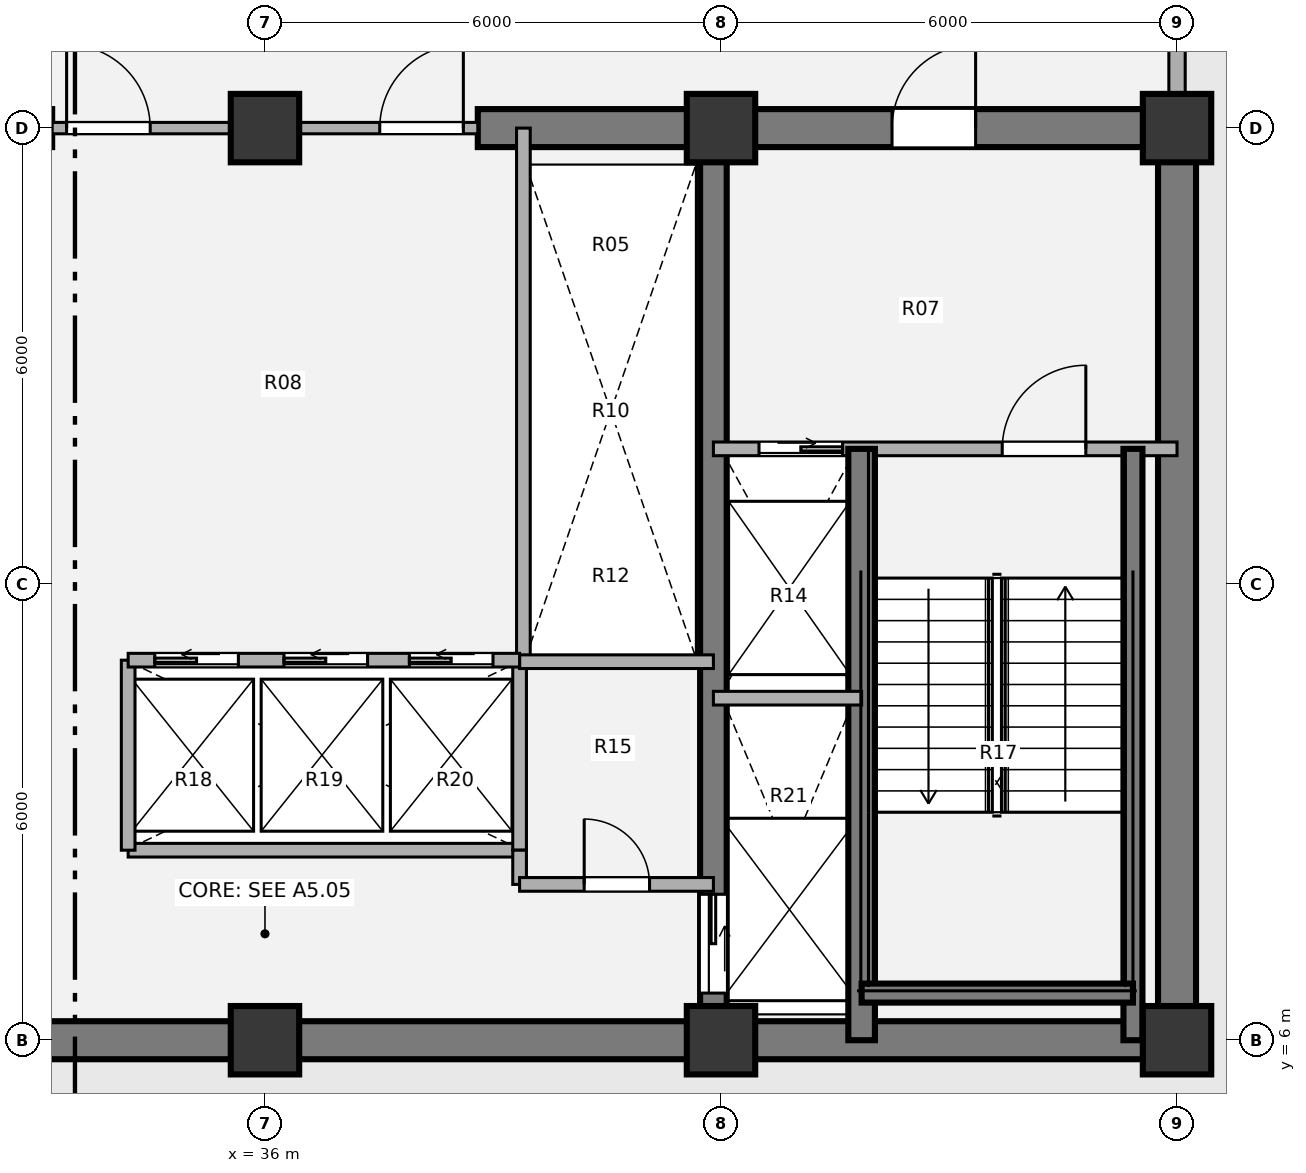
"""IFC4 building model, lengths in metres.
Left out: names, types, materials, properties, quantities, classifications, styles, units other than length and angle.
Written with IfcOpenShell. Run it as: python <this file> out.ifc"""

import sys

from ifc_helpers import new_model, si_unit, direction, frame, frame_2d, origin, origin_2d, place, context, subcontext, project, spatial, rectangle, extrude, source, transform, mapped, element, fill, save


model = new_model("IFC4")
c1 = context("Model", 3, precision=1e-05, world=origin(), true_north=direction((0.0, 1.0)))
c2 = subcontext(c1, "Body", "Model", "MODEL_VIEW")
j1 = project(units=[si_unit("LENGTHUNIT", "METRE"), si_unit("PLANEANGLEUNIT", "RADIAN")], contexts=[c1])
p1 = place(None, origin())
s1 = spatial("IfcSite", under=j1, at=p1, CompositionType="ELEMENT")
p2 = place(p1, origin())
s2 = spatial("IfcBuilding", under=s1, at=p2, CompositionType="ELEMENT")
p3 = place(p2, frame((0.0, 0.0, 85.32)))
s3 = spatial("IfcBuildingStorey", under=s2, at=p3, CompositionType="ELEMENT", Elevation=85.32)
m1 = source(origin(), c2, "Body", "SweptSolid", [
    extrude(rectangle(XDim=0.9, YDim=0.9, at=origin_2d()), origin(), (0.0, 0.0, 1.0), 4.5),
])
for number, where, z_axis, x_axis in (
    (1, (36.0, 6.0, 0.0), (0.0, 0.0, 1.0), (1.0, 0.0, 0.0)),
    (2, (42.0, 6.0, 0.0), (0.0, 0.0, 1.0), (1.0, 0.0, 0.0)),
    (3, (48.0, 6.0, 0.0), (0.0, 0.0, 1.0), (1.0, 0.0, 0.0)),
    (4, (36.0, 18.0, 0.0), (0.0, 0.0, 1.0), (1.0, 0.0, 0.0)),
    (5, (42.0, 18.0, 0.0), (0.0, 0.0, 1.0), (1.0, 0.0, 0.0)),
    (6, (48.0, 18.0, 0.0), (0.0, 0.0, 1.0), (1.0, 0.0, 0.0)),
):
    element("IfcColumn", number, at=place(p3, frame(where, z_axis=z_axis, x_axis=x_axis)), inside=s3, PredefinedType="COLUMN", context=c2, shape_type="MappedRepresentation", body=[
        mapped(m1, transform((0.0, 0.0, 0.0), x_axis=(1.0, 0.0, 0.0), y_axis=(0.0, 1.0, 0.0), z_axis=(0.0, 0.0, 1.0), scale=1.0)),
    ])
p4 = place(p3, frame((48.25, 6.0, 0.0), z_axis=(0.0, 0.0, 1.0), x_axis=(-1.0, 0.0, 0.0)))
e7 = element("IfcWall", 7, at=p4, inside=s3, PredefinedType="SHEAR", context=c2, shape_type="SweptSolid", body=[
    extrude(rectangle(XDim=24.5, YDim=0.5, at=frame_2d((12.25, 0.0))), origin(), (0.0, 0.0, 1.0), 4.5),
])
p5 = place(p3, frame((48.0, 18.0, 0.0), z_axis=(0.0, 0.0, 1.0), x_axis=(0.0, -1.0, 0.0)))
e8 = element("IfcWall", 8, at=p5, inside=s3, PredefinedType="SHEAR", context=c2, shape_type="SweptSolid", body=[
    extrude(rectangle(XDim=12.0, YDim=0.5, at=frame_2d((6.0, 0.0))), origin(), (0.0, 0.0, 1.0), 4.5),
])
p6 = place(p3, frame((23.75, 18.0, 0.0), z_axis=(0.0, 0.0, 1.0), x_axis=(1.0, 0.0, 0.0)))
e9 = element("IfcWall", 9, at=p6, inside=s3, PredefinedType="SHEAR", context=c2, shape_type="SweptSolid", body=[
    extrude(rectangle(XDim=9.45, YDim=0.5, at=frame_2d((4.725, 0.0))), origin(), (0.0, 0.0, 1.0), 4.5),
])
p7 = place(p6, frame((2.95, 0.0, 0.0)))
e10 = element("IfcOpeningElement", 10, at=p7, cuts=e9, PredefinedType="OPENING", context=c2, shape_type="SweptSolid", body=[
    extrude(rectangle(XDim=1.1, YDim=2.1, at=origin_2d()), frame((0.55, 0.26, 1.05), z_axis=(0.0, -1.0, 0.0), x_axis=(1.0, 0.0, 0.0)), (0.0, 0.0, 1.0), 0.52),
])
p8 = place(p3, frame((38.8, 18.0, 0.0), z_axis=(0.0, 0.0, 1.0), x_axis=(1.0, 0.0, 0.0)))
e11 = element("IfcWall", 11, at=p8, inside=s3, PredefinedType="SHEAR", context=c2, shape_type="SweptSolid", body=[
    extrude(rectangle(XDim=9.45, YDim=0.5, at=frame_2d((4.725, 0.0))), origin(), (0.0, 0.0, 1.0), 4.5),
])
p9 = place(p8, frame((5.45, 0.0, 0.0)))
e12 = element("IfcOpeningElement", 12, at=p9, cuts=e11, PredefinedType="OPENING", context=c2, shape_type="SweptSolid", body=[
    extrude(rectangle(XDim=1.1, YDim=2.1, at=origin_2d()), frame((0.55, 0.26, 1.05), z_axis=(0.0, -1.0, 0.0), x_axis=(1.0, 0.0, 0.0)), (0.0, 0.0, 1.0), 0.52),
])
p10 = place(p3, frame((41.9, 18.0, 0.0), z_axis=(0.0, 0.0, 1.0), x_axis=(0.0, -1.0, 0.0)))
e13 = element("IfcWall", 13, at=p10, inside=s3, PredefinedType="SHEAR", context=c2, shape_type="SweptSolid", body=[
    extrude(rectangle(XDim=12.0, YDim=0.35, at=frame_2d((6.0, 0.0))), origin(), (0.0, 0.0, 1.0), 4.5),
])
p11 = place(p10, frame((10.08, 0.0, 0.0)))
e14 = element("IfcOpeningElement", 14, at=p11, cuts=e13, PredefinedType="OPENING", context=c2, shape_type="SweptSolid", body=[
    extrude(rectangle(XDim=1.3, YDim=2.1, at=origin_2d()), frame((0.65, 0.185, 1.05), z_axis=(0.0, -1.0, 0.0), x_axis=(1.0, 0.0, 0.0)), (0.0, 0.0, 1.0), 0.37),
])
p12 = place(p3, frame((48.0, 21.05, 0.0), z_axis=(0.0, 0.0, 1.0), x_axis=(0.0, -1.0, 0.0)))
e15 = element("IfcWall", 15, at=p12, inside=s3, PredefinedType="SOLIDWALL", context=c2, shape_type="SweptSolid", body=[
    extrude(rectangle(XDim=2.62, YDim=0.215, at=frame_2d((1.31, 0.0))), origin(), (0.0, 0.0, 1.0), 4.092),
])
p13 = place(p3, frame((34.2, 8.5, 0.0), z_axis=(0.0, 0.0, 1.0), x_axis=(1.0, 0.0, 0.0)))
e16 = element("IfcWall", 16, at=p13, inside=s3, PredefinedType="PARTITIONING", context=c2, shape_type="SweptSolid", body=[
    extrude(rectangle(XDim=5.15, YDim=0.18, at=frame_2d((2.575, 0.0))), origin(), (0.0, 0.0, 1.0), 4.062),
])
for number, where, z_axis, x_axis in (
    (17, (34.2, 8.5, 0.0), (0.0, 0.0, 1.0), (0.0, 1.0, 0.0)),
    (18, (39.35, 8.5, 0.0), (0.0, 0.0, 1.0), (0.0, 1.0, 0.0)),
):
    element("IfcWall", number, at=place(p3, frame(where, z_axis=z_axis, x_axis=x_axis)), inside=s3, PredefinedType="PARTITIONING", context=c2, shape_type="SweptSolid", body=[
        extrude(rectangle(XDim=2.5, YDim=0.18, at=frame_2d((1.25, 0.0))), origin(), (0.0, 0.0, 1.0), 4.062),
    ])
p14 = place(p3, frame((39.4, 11.0, 0.0), z_axis=(0.0, 0.0, 1.0), x_axis=(0.0, 1.0, 0.0)))
e19 = element("IfcWall", 19, at=p14, inside=s3, PredefinedType="PARTITIONING", context=c2, shape_type="SweptSolid", body=[
    extrude(rectangle(XDim=7.0, YDim=0.18, at=frame_2d((3.5, 0.0))), origin(), (0.0, 0.0, 1.0), 4.062),
])
p15 = place(p3, frame((39.35, 10.98, 0.0), z_axis=(0.0, 0.0, 1.0), x_axis=(1.0, 0.0, 0.0)))
e20 = element("IfcWall", 20, at=p15, inside=s3, PredefinedType="PARTITIONING", context=c2, shape_type="SweptSolid", body=[
    extrude(rectangle(XDim=2.55, YDim=0.18, at=frame_2d((1.275, 0.0))), origin(), (0.0, 0.0, 1.0), 4.062),
])
p16 = place(p3, frame((39.35, 8.05, 0.0), z_axis=(0.0, 0.0, 1.0), x_axis=(0.0, 1.0, 0.0)))
e21 = element("IfcWall", 21, at=p16, inside=s3, PredefinedType="PARTITIONING", context=c2, shape_type="SweptSolid", body=[
    extrude(rectangle(XDim=0.45, YDim=0.18, at=frame_2d((0.225, 0.0))), origin(), (0.0, 0.0, 1.0), 4.062),
])
p17 = place(p3, frame((39.35, 8.05, 0.0), z_axis=(0.0, 0.0, 1.0), x_axis=(1.0, 0.0, 0.0)))
e22 = element("IfcWall", 22, at=p17, inside=s3, PredefinedType="PARTITIONING", context=c2, shape_type="SweptSolid", body=[
    extrude(rectangle(XDim=2.55, YDim=0.18, at=frame_2d((1.275, 0.0))), origin(), (0.0, 0.0, 1.0), 4.062),
])
p18 = place(p17, frame((0.85, 0.0, 0.0)))
e23 = element("IfcOpeningElement", 23, at=p18, cuts=e22, PredefinedType="OPENING", context=c2, shape_type="SweptSolid", body=[
    extrude(rectangle(XDim=0.86, YDim=2.1, at=origin_2d()), frame((0.43, 0.1, 1.05), z_axis=(0.0, -1.0, 0.0), x_axis=(1.0, 0.0, 0.0)), (0.0, 0.0, 1.0), 0.2),
])
p19 = place(p3, frame((33.2, 18.0, 0.0), z_axis=(0.0, 0.0, 1.0), x_axis=(1.0, 0.0, 0.0)))
e24 = element("IfcWall", 24, at=p19, inside=s3, PredefinedType="PARTITIONING", context=c2, shape_type="SweptSolid", body=[
    extrude(rectangle(XDim=5.6, YDim=0.15, at=frame_2d((2.8, 0.0))), origin(), (0.0, 0.0, 1.0), 2.877),
])
p20 = place(p19, frame((0.19, 0.0, 0.0)))
e25 = element("IfcOpeningElement", 25, at=p20, cuts=e24, PredefinedType="OPENING", context=c2, shape_type="SweptSolid", body=[
    extrude(rectangle(XDim=1.1, YDim=2.1, at=origin_2d()), frame((0.55, 0.085, 1.05), z_axis=(0.0, -1.0, 0.0), x_axis=(1.0, 0.0, 0.0)), (0.0, 0.0, 1.0), 0.17),
])
p21 = place(p19, frame((4.31, 0.0, 0.0)))
e26 = element("IfcOpeningElement", 26, at=p21, cuts=e24, PredefinedType="OPENING", context=c2, shape_type="SweptSolid", body=[
    extrude(rectangle(XDim=1.1, YDim=2.1, at=origin_2d()), frame((0.55, 0.085, 1.05), z_axis=(0.0, -1.0, 0.0), x_axis=(1.0, 0.0, 0.0)), (0.0, 0.0, 1.0), 0.17),
])
p22 = place(p3, frame((41.9, 13.78, 0.0), z_axis=(0.0, 0.0, 1.0), x_axis=(1.0, 0.0, 0.0)))
e27 = element("IfcWall", 27, at=p22, inside=s3, PredefinedType="PARTITIONING", context=c2, shape_type="SweptSolid", body=[
    extrude(rectangle(XDim=6.1, YDim=0.18, at=frame_2d((3.05, 0.0))), origin(), (0.0, 0.0, 1.0), 4.062),
])
p23 = place(p22, frame((0.6, 0.0, 0.0)))
e28 = element("IfcOpeningElement", 28, at=p23, cuts=e27, PredefinedType="OPENING", context=c2, shape_type="SweptSolid", body=[
    extrude(rectangle(XDim=1.1, YDim=2.1, at=origin_2d()), frame((0.55, 0.1, 1.05), z_axis=(0.0, -1.0, 0.0), x_axis=(1.0, 0.0, 0.0)), (0.0, 0.0, 1.0), 0.2),
])
p24 = place(p22, frame((3.8, 0.0, 0.0)))
e29 = element("IfcOpeningElement", 29, at=p24, cuts=e27, PredefinedType="OPENING", context=c2, shape_type="SweptSolid", body=[
    extrude(rectangle(XDim=1.1, YDim=2.1, at=origin_2d()), frame((0.55, 0.1, 1.05), z_axis=(0.0, -1.0, 0.0), x_axis=(1.0, 0.0, 0.0)), (0.0, 0.0, 1.0), 0.2),
])
p25 = place(p3, frame((43.85, 6.0, 0.0), z_axis=(0.0, 0.0, 1.0), x_axis=(0.0, 1.0, 0.0)))
e30 = element("IfcWall", 30, at=p25, inside=s3, PredefinedType="SHEAR", context=c2, shape_type="SweptSolid", body=[
    extrude(rectangle(XDim=7.78, YDim=0.35, at=frame_2d((3.89, 0.0))), origin(), (0.0, 0.0, 1.0), 4.412),
])
p26 = place(p3, frame((47.42, 6.0, 0.0), z_axis=(0.0, 0.0, 1.0), x_axis=(0.0, 1.0, 0.0)))
e31 = element("IfcWall", 31, at=p26, inside=s3, PredefinedType="SHEAR", context=c2, shape_type="SweptSolid", body=[
    extrude(rectangle(XDim=7.78, YDim=0.25, at=frame_2d((3.89, 0.0))), origin(), (0.0, 0.0, 1.0), 4.412),
])
p27 = place(p3, frame((43.85, 6.62, 0.0), z_axis=(0.0, 0.0, 1.0), x_axis=(1.0, 0.0, 0.0)))
e32 = element("IfcWall", 32, at=p27, inside=s3, PredefinedType="SHEAR", context=c2, shape_type="SweptSolid", body=[
    extrude(rectangle(XDim=3.57, YDim=0.25, at=frame_2d((1.785, 0.0))), origin(), (0.0, 0.0, 1.0), 4.412),
])
p28 = place(p3, frame((41.9, 10.5, 0.0), z_axis=(0.0, 0.0, 1.0), x_axis=(1.0, 0.0, 0.0)))
e33 = element("IfcWall", 33, at=p28, inside=s3, PredefinedType="PARTITIONING", context=c2, shape_type="SweptSolid", body=[
    extrude(rectangle(XDim=1.95, YDim=0.18, at=frame_2d((0.975, 0.0))), origin(), (0.0, 0.0, 1.0), 4.062),
])
p29 = place(p3, frame((34.2, 11.0, 0.0), z_axis=(0.0, 0.0, 1.0), x_axis=(1.0, 0.0, 0.0)))
e34 = element("IfcWall", 34, at=p29, inside=s3, PredefinedType="PARTITIONING", context=c2, shape_type="SweptSolid", body=[
    extrude(rectangle(XDim=5.15, YDim=0.18, at=frame_2d((2.575, 0.0))), origin(), (0.0, 0.0, 1.0), 4.062),
])
p30 = place(p29, frame((0.35, 0.0, 0.0)))
e35 = element("IfcOpeningElement", 35, at=p30, cuts=e34, PredefinedType="OPENING", context=c2, shape_type="SweptSolid", body=[
    extrude(rectangle(XDim=1.1, YDim=2.1, at=origin_2d()), frame((0.55, 0.1, 1.05), z_axis=(0.0, -1.0, 0.0), x_axis=(1.0, 0.0, 0.0)), (0.0, 0.0, 1.0), 0.2),
])
p31 = place(p29, frame((2.05, 0.0, 0.0)))
e36 = element("IfcOpeningElement", 36, at=p31, cuts=e34, PredefinedType="OPENING", context=c2, shape_type="SweptSolid", body=[
    extrude(rectangle(XDim=1.1, YDim=2.1, at=origin_2d()), frame((0.55, 0.1, 1.05), z_axis=(0.0, -1.0, 0.0), x_axis=(1.0, 0.0, 0.0)), (0.0, 0.0, 1.0), 0.2),
])
p32 = place(p29, frame((3.7, 0.0, 0.0)))
e37 = element("IfcOpeningElement", 37, at=p32, cuts=e34, PredefinedType="OPENING", context=c2, shape_type="SweptSolid", body=[
    extrude(rectangle(XDim=1.1, YDim=2.1, at=origin_2d()), frame((0.55, 0.1, 1.05), z_axis=(0.0, -1.0, 0.0), x_axis=(1.0, 0.0, 0.0)), (0.0, 0.0, 1.0), 0.2),
])
m2 = source(origin(), c2, "Body", "SweptSolid", [
    extrude(rectangle(XDim=0.86, YDim=2.1, at=origin_2d()), frame((0.43, 0.025, 1.05), z_axis=(0.0, -1.0, 0.0), x_axis=(1.0, 0.0, 0.0)), (0.0, 0.0, 1.0), 0.05),
])
p33 = place(p18, origin())
e38 = element("IfcDoor", 38, at=p33, inside=s3, OperationType="SINGLE_SWING_LEFT", PredefinedType="DOOR", context=c2, shape_type="MappedRepresentation", body=[
    mapped(m2, transform((0.0, 0.0, 0.0), x_axis=(1.0, 0.0, 0.0), y_axis=(0.0, 1.0, 0.0), z_axis=(0.0, 0.0, 1.0), scale=1.0)),
])
fill(e23, e38)
m3 = source(origin(), c2, "Body", "SweptSolid", [
    extrude(rectangle(XDim=1.1, YDim=2.1, at=origin_2d()), frame((0.55, 0.025, 1.05), z_axis=(0.0, -1.0, 0.0), x_axis=(1.0, 0.0, 0.0)), (0.0, 0.0, 1.0), 0.05),
])
p34 = place(p20, origin())
e39 = element("IfcDoor", 39, at=p34, inside=s3, OperationType="SINGLE_SWING_LEFT", PredefinedType="DOOR", context=c2, shape_type="MappedRepresentation", body=[
    mapped(m3, transform((0.0, 0.0, 0.0), x_axis=(1.0, 0.0, 0.0), y_axis=(0.0, 1.0, 0.0), z_axis=(0.0, 0.0, 1.0), scale=1.0)),
])
fill(e25, e39)
p35 = place(p21, origin())
e40 = element("IfcDoor", 40, at=p35, inside=s3, OperationType="SINGLE_SWING_RIGHT", PredefinedType="DOOR", context=c2, shape_type="MappedRepresentation", body=[
    mapped(m3, transform((0.0, 0.0, 0.0), x_axis=(1.0, 0.0, 0.0), y_axis=(0.0, 1.0, 0.0), z_axis=(0.0, 0.0, 1.0), scale=1.0)),
])
fill(e26, e40)
m4 = source(origin(), c2, "Body", "SweptSolid", [
    extrude(rectangle(XDim=1.1, YDim=2.1, at=origin_2d()), frame((0.55, 0.025, 1.05), z_axis=(0.0, -1.0, 0.0), x_axis=(1.0, 0.0, 0.0)), (0.0, 0.0, 1.0), 0.05),
])
p36 = place(p23, origin())
e41 = element("IfcDoor", 41, at=p36, inside=s3, OperationType="SLIDING_TO_RIGHT", PredefinedType="DOOR", context=c2, shape_type="MappedRepresentation", body=[
    mapped(m4, transform((0.0, 0.0, 0.0), x_axis=(1.0, 0.0, 0.0), y_axis=(0.0, 1.0, 0.0), z_axis=(0.0, 0.0, 1.0), scale=1.0)),
])
fill(e28, e41)
m5 = source(origin(), c2, "Body", "SweptSolid", [
    extrude(rectangle(XDim=1.1, YDim=2.1, at=origin_2d()), frame((0.55, 0.025, 1.05), z_axis=(0.0, -1.0, 0.0), x_axis=(1.0, 0.0, 0.0)), (0.0, 0.0, 1.0), 0.05),
])
p37 = place(p24, origin())
e42 = element("IfcDoor", 42, at=p37, inside=s3, OperationType="SINGLE_SWING_RIGHT", PredefinedType="DOOR", context=c2, shape_type="MappedRepresentation", body=[
    mapped(m5, transform((0.0, 0.0, 0.0), x_axis=(1.0, 0.0, 0.0), y_axis=(0.0, 1.0, 0.0), z_axis=(0.0, 0.0, 1.0), scale=1.0)),
])
fill(e29, e42)
m6 = source(origin(), c2, "Body", "SweptSolid", [
    extrude(rectangle(XDim=1.3, YDim=2.1, at=origin_2d()), frame((0.65, 0.025, 1.05), z_axis=(0.0, -1.0, 0.0), x_axis=(1.0, 0.0, 0.0)), (0.0, 0.0, 1.0), 0.05),
])
p38 = place(p11, origin())
e43 = element("IfcDoor", 43, at=p38, inside=s3, OperationType="SLIDING_TO_LEFT", PredefinedType="DOOR", context=c2, shape_type="MappedRepresentation", body=[
    mapped(m6, transform((0.0, 0.0, 0.0), x_axis=(1.0, 0.0, 0.0), y_axis=(0.0, 1.0, 0.0), z_axis=(0.0, 0.0, 1.0), scale=1.0)),
])
fill(e14, e43)
p39 = place(p9, origin())
e44 = element("IfcDoor", 44, at=p39, inside=s3, OperationType="SINGLE_SWING_RIGHT", PredefinedType="DOOR", context=c2, shape_type="MappedRepresentation", body=[
    mapped(m3, transform((0.0, 0.0, 0.0), x_axis=(1.0, 0.0, 0.0), y_axis=(0.0, 1.0, 0.0), z_axis=(0.0, 0.0, 1.0), scale=1.0)),
])
fill(e12, e44)
p40 = place(p30, origin())
e45 = element("IfcDoor", 45, at=p40, inside=s3, OperationType="SLIDING_TO_LEFT", PredefinedType="DOOR", context=c2, shape_type="MappedRepresentation", body=[
    mapped(m4, transform((0.0, 0.0, 0.0), x_axis=(1.0, 0.0, 0.0), y_axis=(0.0, 1.0, 0.0), z_axis=(0.0, 0.0, 1.0), scale=1.0)),
])
fill(e35, e45)
p41 = place(p31, origin())
e46 = element("IfcDoor", 46, at=p41, inside=s3, OperationType="SLIDING_TO_LEFT", PredefinedType="DOOR", context=c2, shape_type="MappedRepresentation", body=[
    mapped(m4, transform((0.0, 0.0, 0.0), x_axis=(1.0, 0.0, 0.0), y_axis=(0.0, 1.0, 0.0), z_axis=(0.0, 0.0, 1.0), scale=1.0)),
])
fill(e36, e46)
p42 = place(p32, origin())
e47 = element("IfcDoor", 47, at=p42, inside=s3, OperationType="SLIDING_TO_LEFT", PredefinedType="DOOR", context=c2, shape_type="MappedRepresentation", body=[
    mapped(m4, transform((0.0, 0.0, 0.0), x_axis=(1.0, 0.0, 0.0), y_axis=(0.0, 1.0, 0.0), z_axis=(0.0, 0.0, 1.0), scale=1.0)),
])
fill(e37, e47)
save(model, sys.argv[1])
